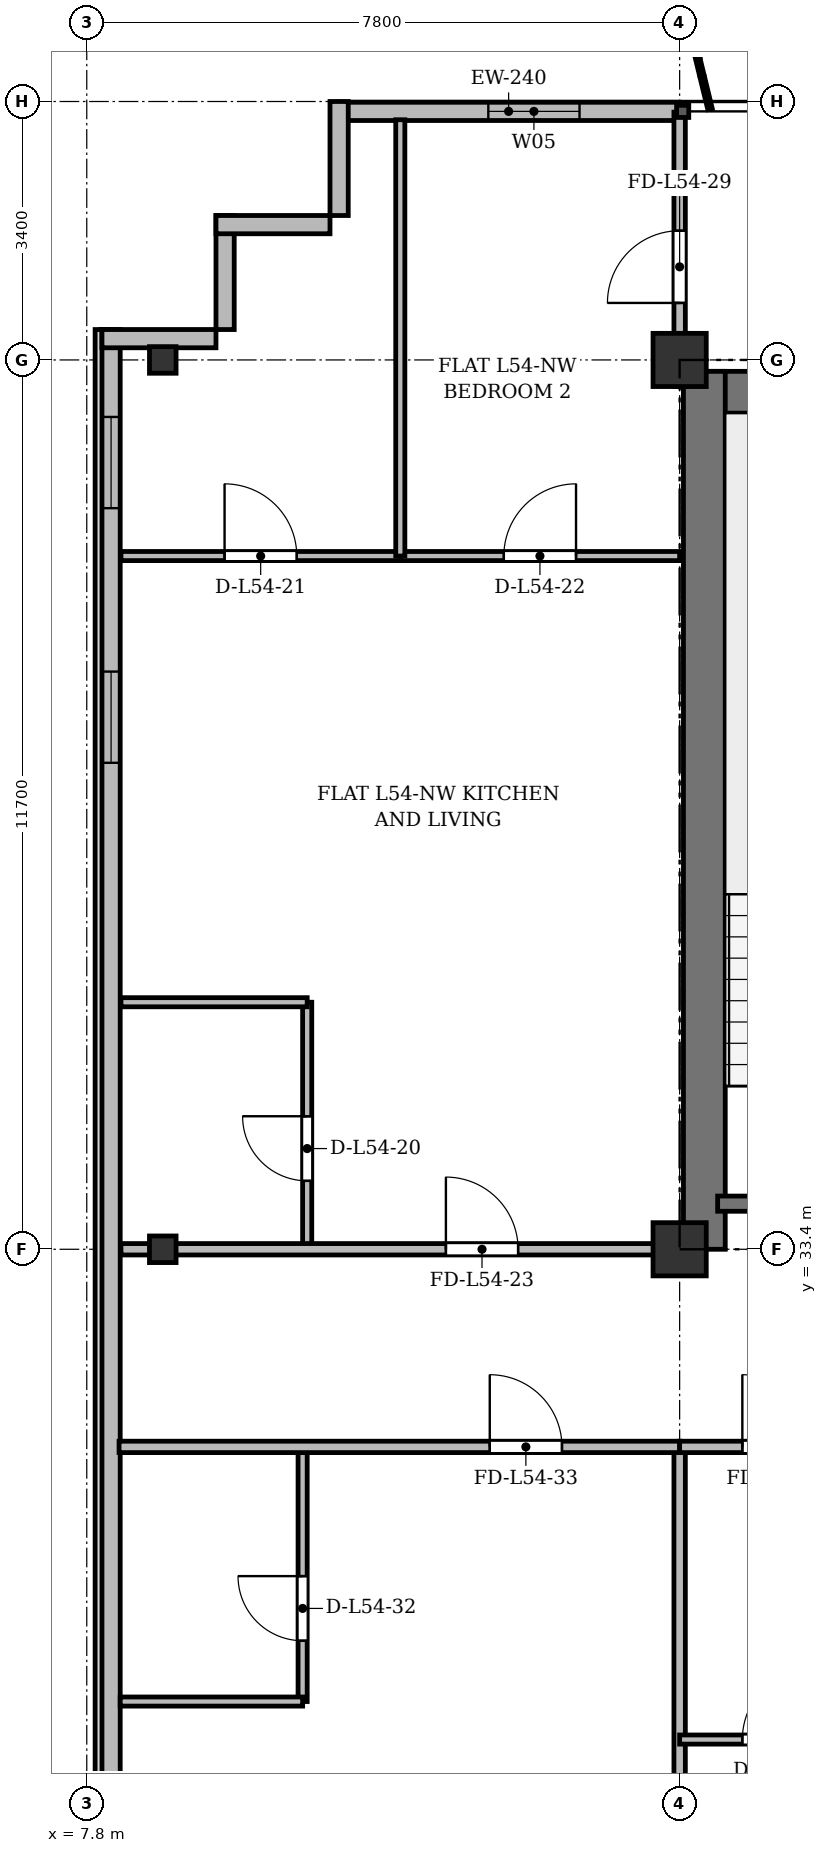
"""IFC4 building model, lengths in metres.
Left out: names, types, materials, properties, quantities, classifications, styles, units other than length and angle.
Written with IfcOpenShell. Run it as: python <this file> out.ifc"""

import sys

from ifc_helpers import new_model, si_unit, direction, frame, frame_2d, origin, origin_2d, place, context, subcontext, project, spatial, rectangle, i_section, extrude, source, transform, mapped, element, fill, save


model = new_model("IFC4")
c1 = context("Model", 3, precision=1e-05, world=origin(), true_north=direction((0.0, 1.0)))
c2 = subcontext(c1, "Body", "Model", "MODEL_VIEW")
j1 = project(units=[si_unit("LENGTHUNIT", "METRE"), si_unit("PLANEANGLEUNIT", "RADIAN")], contexts=[c1])
p1 = place(None, origin())
s1 = spatial("IfcSite", under=j1, at=p1, CompositionType="ELEMENT")
p2 = place(p1, origin())
s2 = spatial("IfcBuilding", under=s1, at=p2, CompositionType="ELEMENT")
p3 = place(p2, frame((0.0, 0.0, 208.5)))
s3 = spatial("IfcBuildingStorey", under=s2, at=p3, CompositionType="ELEMENT", Elevation=208.5)
m1 = source(origin(), c2, "Body", "SweptSolid", [
    extrude(i_section(OverallWidth=0.35, OverallDepth=0.35, WebThickness=0.018, FlangeThickness=0.028, at=origin_2d()), origin(), (0.0, 0.0, 1.0), 3.6),
])
for number, where, z_axis, x_axis in (
    (1, (8.8, 33.4, 0.0), (0.0, 0.0, 1.0), (1.0, 0.0, 0.0)),
    (2, (8.8, 45.1, 0.0), (0.0, 0.0, 1.0), (1.0, 0.0, 0.0)),
):
    element("IfcColumn", number, at=place(p3, frame(where, z_axis=z_axis, x_axis=x_axis)), inside=s3, PredefinedType="COLUMN", context=c2, shape_type="MappedRepresentation", body=[
        mapped(m1, transform((0.0, 0.0, 0.0), x_axis=(1.0, 0.0, 0.0), y_axis=(0.0, 1.0, 0.0), z_axis=(0.0, 0.0, 1.0), scale=1.0)),
    ])
m2 = source(origin(), c2, "Body", "SweptSolid", [
    extrude(rectangle(XDim=0.7, YDim=0.7, at=origin_2d()), origin(), (0.0, 0.0, 1.0), 3.6),
])
for number, where, z_axis, x_axis in (
    (3, (15.6, 33.4, 0.0), (0.0, 0.0, 1.0), (1.0, 0.0, 0.0)),
    (4, (15.6, 45.1, 0.0), (0.0, 0.0, 1.0), (1.0, 0.0, 0.0)),
):
    element("IfcColumn", number, at=place(p3, frame(where, z_axis=z_axis, x_axis=x_axis)), inside=s3, PredefinedType="COLUMN", context=c2, shape_type="MappedRepresentation", body=[
        mapped(m2, transform((0.0, 0.0, 0.0), x_axis=(1.0, 0.0, 0.0), y_axis=(0.0, 1.0, 0.0), z_axis=(0.0, 0.0, 1.0), scale=1.0)),
    ])
p4 = place(p3, frame((11.1, 48.37, 0.0), z_axis=(0.0, 0.0, 1.0), x_axis=(1.0, 0.0, 0.0)))
e5 = element("IfcWall", 5, at=p4, inside=s3, PredefinedType="SOLIDWALL", context=c2, shape_type="SweptSolid", body=[
    extrude(rectangle(XDim=4.5, YDim=0.24, at=frame_2d((2.25, 0.0))), origin(), (0.0, 0.0, 1.0), 3.36),
])
p5 = place(p4, frame((1.983, 0.0, 0.9)))
e6 = element("IfcOpeningElement", 6, at=p5, cuts=e5, PredefinedType="OPENING", context=c2, shape_type="SweptSolid", body=[
    extrude(rectangle(XDim=1.2, YDim=1.65, at=frame_2d((0.6, 0.825))), frame((0.0, 0.13, 0.0), z_axis=(0.0, -1.0, 0.0), x_axis=(1.0, 0.0, 0.0)), (0.0, 0.0, 1.0), 0.26),
])
p6 = place(p3, frame((8.12, 6.4, 0.0), z_axis=(0.0, 0.0, 1.0), x_axis=(0.0, 1.0, 0.0)))
e7 = element("IfcWall", 7, at=p6, inside=s3, PredefinedType="SOLIDWALL", context=c2, shape_type="SweptSolid", body=[
    extrude(rectangle(XDim=39.1, YDim=0.24, at=frame_2d((19.55, 0.0))), origin(), (0.0, 0.0, 1.0), 3.36),
])
p7 = place(p6, frame((1.45, 0.0, 0.92)))
e8 = element("IfcOpeningElement", 8, at=p7, cuts=e7, PredefinedType="OPENING", context=c2, shape_type="SweptSolid", body=[
    extrude(rectangle(XDim=1.2, YDim=1.65, at=frame_2d((0.6, 0.825))), frame((0.0, 0.13, 0.0), z_axis=(0.0, -1.0, 0.0), x_axis=(1.0, 0.0, 0.0)), (0.0, 0.0, 1.0), 0.26),
])
p8 = place(p6, frame((3.7, 0.0, 0.92)))
e9 = element("IfcOpeningElement", 9, at=p8, cuts=e7, PredefinedType="OPENING", context=c2, shape_type="SweptSolid", body=[
    extrude(rectangle(XDim=2.6, YDim=1.9, at=frame_2d((1.3, 0.95))), frame((0.0, 0.13, 0.0), z_axis=(0.0, -1.0, 0.0), x_axis=(1.0, 0.0, 0.0)), (0.0, 0.0, 1.0), 0.26),
])
p9 = place(p6, frame((7.9, 0.0, 0.92)))
e10 = element("IfcOpeningElement", 10, at=p9, cuts=e7, PredefinedType="OPENING", context=c2, shape_type="SweptSolid", body=[
    extrude(rectangle(XDim=2.6, YDim=1.9, at=frame_2d((1.3, 0.95))), frame((0.0, 0.13, 0.0), z_axis=(0.0, -1.0, 0.0), x_axis=(1.0, 0.0, 0.0)), (0.0, 0.0, 1.0), 0.26),
])
p10 = place(p6, frame((15.1, 0.0, 0.92)))
e11 = element("IfcOpeningElement", 11, at=p10, cuts=e7, PredefinedType="OPENING", context=c2, shape_type="SweptSolid", body=[
    extrude(rectangle(XDim=2.6, YDim=1.9, at=frame_2d((1.3, 0.95))), frame((0.0, 0.13, 0.0), z_axis=(0.0, -1.0, 0.0), x_axis=(1.0, 0.0, 0.0)), (0.0, 0.0, 1.0), 0.26),
])
p11 = place(p6, frame((33.4, 0.0, 0.92)))
e12 = element("IfcOpeningElement", 12, at=p11, cuts=e7, PredefinedType="OPENING", context=c2, shape_type="SweptSolid", body=[
    extrude(rectangle(XDim=1.2, YDim=1.65, at=frame_2d((0.6, 0.825))), frame((0.0, 0.13, 0.0), z_axis=(0.0, -1.0, 0.0), x_axis=(1.0, 0.0, 0.0)), (0.0, 0.0, 1.0), 0.26),
])
p12 = place(p6, frame((36.75, 0.0, 0.92)))
e13 = element("IfcOpeningElement", 13, at=p12, cuts=e7, PredefinedType="OPENING", context=c2, shape_type="SweptSolid", body=[
    extrude(rectangle(XDim=1.2, YDim=1.65, at=frame_2d((0.6, 0.825))), frame((0.0, 0.13, 0.0), z_axis=(0.0, -1.0, 0.0), x_axis=(1.0, 0.0, 0.0)), (0.0, 0.0, 1.0), 0.26),
])
for number, where, z_axis, x_axis in (
    (14, (8.0, 45.38, 0.0), (0.0, 0.0, 1.0), (1.0, 0.0, 0.0)),
    (15, (9.62, 45.5, 0.0), (0.0, 0.0, 1.0), (0.0, 1.0, 0.0)),
    (16, (9.5, 46.88, 0.0), (0.0, 0.0, 1.0), (1.0, 0.0, 0.0)),
    (17, (11.12, 47.0, 0.0), (0.0, 0.0, 1.0), (0.0, 1.0, 0.0)),
):
    element("IfcWall", number, at=place(p3, frame(where, z_axis=z_axis, x_axis=x_axis)), inside=s3, PredefinedType="SOLIDWALL", context=c2, shape_type="SweptSolid", body=[
        extrude(rectangle(XDim=1.5, YDim=0.24, at=frame_2d((0.75, 0.0))), origin(), (0.0, 0.0, 1.0), 3.36),
    ])
p13 = place(p3, frame((15.65, 44.675, 0.0), z_axis=(0.0, 0.0, 1.0), x_axis=(1.0, 0.0, 0.0)))
e18 = element("IfcWall", 18, at=p13, inside=s3, PredefinedType="SHEAR", context=c2, shape_type="SweptSolid", body=[
    extrude(rectangle(XDim=43.1, YDim=0.55, at=frame_2d((21.55, 0.0))), origin(), (0.0, 0.0, 1.0), 3.36),
])
p14 = place(p3, frame((15.925, 33.4, 0.0), z_axis=(0.0, 0.0, 1.0), x_axis=(0.0, 1.0, 0.0)))
e19 = element("IfcWall", 19, at=p14, inside=s3, PredefinedType="SHEAR", context=c2, shape_type="SweptSolid", body=[
    extrude(rectangle(XDim=11.55, YDim=0.55, at=frame_2d((5.775, 0.0))), origin(), (0.0, 0.0, 1.0), 3.36),
])
p15 = place(p3, frame((16.1, 34.0, 0.0), z_axis=(0.0, 0.0, 1.0), x_axis=(1.0, 0.0, 0.0)))
e20 = element("IfcWall", 20, at=p15, inside=s3, PredefinedType="SHEAR", context=c2, shape_type="SweptSolid", body=[
    extrude(rectangle(XDim=3.4, YDim=0.2, at=frame_2d((1.7, 0.0))), origin(), (0.0, 0.0, 1.0), 3.36),
])
p16 = place(p3, frame((10.7, 33.4, 0.0), z_axis=(0.0, 0.0, 1.0), x_axis=(0.0, 1.0, 0.0)))
e21 = element("IfcWall", 21, at=p16, inside=s3, PredefinedType="PARTITIONING", context=c2, shape_type="SweptSolid", body=[
    extrude(rectangle(XDim=3.25, YDim=0.12, at=frame_2d((1.625, 0.0))), origin(), (0.0, 0.0, 1.0), 2.91),
])
p17 = place(p16, frame((0.9, 0.0, 0.0)))
e22 = element("IfcOpeningElement", 22, at=p17, cuts=e21, PredefinedType="OPENING", context=c2, shape_type="SweptSolid", body=[
    extrude(rectangle(XDim=0.85, YDim=2.1, at=frame_2d((0.425, 1.05))), frame((0.0, 0.07, 0.0), z_axis=(0.0, -1.0, 0.0), x_axis=(1.0, 0.0, 0.0)), (0.0, 0.0, 1.0), 0.14),
])
p18 = place(p3, frame((8.25, 36.65, 0.0), z_axis=(0.0, 0.0, 1.0), x_axis=(1.0, 0.0, 0.0)))
e23 = element("IfcWall", 23, at=p18, inside=s3, PredefinedType="PARTITIONING", context=c2, shape_type="SweptSolid", body=[
    extrude(rectangle(XDim=2.45, YDim=0.12, at=frame_2d((1.225, 0.0))), origin(), (0.0, 0.0, 1.0), 2.86),
])
p19 = place(p3, frame((8.25, 42.52, 0.0), z_axis=(0.0, 0.0, 1.0), x_axis=(1.0, 0.0, 0.0)))
e24 = element("IfcWall", 24, at=p19, inside=s3, PredefinedType="PARTITIONING", context=c2, shape_type="SweptSolid", body=[
    extrude(rectangle(XDim=3.675, YDim=0.12, at=frame_2d((1.837, 0.0))), origin(), (0.0, 0.0, 1.0), 2.86),
])
p20 = place(p19, frame((1.363, 0.0, 0.0)))
e25 = element("IfcOpeningElement", 25, at=p20, cuts=e24, PredefinedType="OPENING", context=c2, shape_type="SweptSolid", body=[
    extrude(rectangle(XDim=0.95, YDim=2.15, at=frame_2d((0.475, 1.075))), frame((0.0, 0.07, 0.0), z_axis=(0.0, -1.0, 0.0), x_axis=(1.0, 0.0, 0.0)), (0.0, 0.0, 1.0), 0.14),
])
p21 = place(p3, frame((11.925, 42.52, 0.0), z_axis=(0.0, 0.0, 1.0), x_axis=(1.0, 0.0, 0.0)))
e26 = element("IfcWall", 26, at=p21, inside=s3, PredefinedType="PARTITIONING", context=c2, shape_type="SweptSolid", body=[
    extrude(rectangle(XDim=3.675, YDim=0.12, at=frame_2d((1.837, 0.0))), origin(), (0.0, 0.0, 1.0), 2.86),
])
p22 = place(p21, frame((1.362, 0.0, 0.0)))
e27 = element("IfcOpeningElement", 27, at=p22, cuts=e26, PredefinedType="OPENING", context=c2, shape_type="SweptSolid", body=[
    extrude(rectangle(XDim=0.95, YDim=2.15, at=frame_2d((0.475, 1.075))), frame((0.0, 0.07, 0.0), z_axis=(0.0, -1.0, 0.0), x_axis=(1.0, 0.0, 0.0)), (0.0, 0.0, 1.0), 0.14),
])
p23 = place(p3, frame((11.925, 42.52, 0.0), z_axis=(0.0, 0.0, 1.0), x_axis=(0.0, 1.0, 0.0)))
e28 = element("IfcWall", 28, at=p23, inside=s3, PredefinedType="PARTITIONING", context=c2, shape_type="SweptSolid", body=[
    extrude(rectangle(XDim=5.74, YDim=0.12, at=frame_2d((2.87, 0.0))), origin(), (0.0, 0.0, 1.0), 2.91),
])
p24 = place(p3, frame((8.25, 33.4, 0.0), z_axis=(0.0, 0.0, 1.0), x_axis=(1.0, 0.0, 0.0)))
e29 = element("IfcWall", 29, at=p24, inside=s3, PredefinedType="PARTITIONING", context=c2, shape_type="SweptSolid", body=[
    extrude(rectangle(XDim=7.35, YDim=0.15, at=frame_2d((3.675, 0.0))), origin(), (0.0, 0.0, 1.0), 2.91),
])
p25 = place(p24, frame((4.275, 0.0, 0.0)))
e30 = element("IfcOpeningElement", 30, at=p25, cuts=e29, PredefinedType="OPENING", context=c2, shape_type="SweptSolid", body=[
    extrude(rectangle(XDim=0.95, YDim=2.15, at=frame_2d((0.475, 1.075))), frame((0.0, 0.085, 0.0), z_axis=(0.0, -1.0, 0.0), x_axis=(1.0, 0.0, 0.0)), (0.0, 0.0, 1.0), 0.17),
])
p26 = place(p3, frame((15.6, 44.75, 0.0), z_axis=(0.0, 0.0, 1.0), x_axis=(0.0, 1.0, 0.0)))
e31 = element("IfcWall", 31, at=p26, inside=s3, PredefinedType="PARTITIONING", context=c2, shape_type="SweptSolid", body=[
    extrude(rectangle(XDim=3.61, YDim=0.15, at=frame_2d((1.805, 0.0))), origin(), (0.0, 0.0, 1.0), 2.86),
])
p27 = place(p26, frame((1.1, 0.0, 0.0)))
e32 = element("IfcOpeningElement", 32, at=p27, cuts=e31, PredefinedType="OPENING", context=c2, shape_type="SweptSolid", body=[
    extrude(rectangle(XDim=0.95, YDim=2.15, at=frame_2d((0.475, 1.075))), frame((0.0, 0.085, 0.0), z_axis=(0.0, -1.0, 0.0), x_axis=(1.0, 0.0, 0.0)), (0.0, 0.0, 1.0), 0.17),
])
p28 = place(p3, frame((15.6, 3.625, 0.0), z_axis=(0.0, 0.0, 1.0), x_axis=(0.0, 1.0, 0.0)))
e33 = element("IfcWall", 33, at=p28, inside=s3, PredefinedType="PARTITIONING", context=c2, shape_type="SweptSolid", body=[
    extrude(rectangle(XDim=27.175, YDim=0.15, at=frame_2d((13.587, 0.0))), origin(), (0.0, 0.0, 1.0), 2.86),
])
p29 = place(p3, frame((10.64, 27.45, 0.0), z_axis=(0.0, 0.0, 1.0), x_axis=(0.0, 1.0, 0.0)))
e34 = element("IfcWall", 34, at=p29, inside=s3, PredefinedType="PARTITIONING", context=c2, shape_type="SweptSolid", body=[
    extrude(rectangle(XDim=3.35, YDim=0.12, at=frame_2d((1.675, 0.0))), origin(), (0.0, 0.0, 1.0), 3.36),
])
p30 = place(p29, frame((0.8, 0.0, 0.0)))
e35 = element("IfcOpeningElement", 35, at=p30, cuts=e34, PredefinedType="OPENING", context=c2, shape_type="SweptSolid", body=[
    extrude(rectangle(XDim=0.85, YDim=2.1, at=frame_2d((0.425, 1.05))), frame((0.0, 0.07, 0.0), z_axis=(0.0, -1.0, 0.0), x_axis=(1.0, 0.0, 0.0)), (0.0, 0.0, 1.0), 0.14),
])
p31 = place(p3, frame((8.24, 27.45, 0.0), z_axis=(0.0, 0.0, 1.0), x_axis=(1.0, 0.0, 0.0)))
e36 = element("IfcWall", 36, at=p31, inside=s3, PredefinedType="PARTITIONING", context=c2, shape_type="SweptSolid", body=[
    extrude(rectangle(XDim=2.4, YDim=0.12, at=frame_2d((1.2, 0.0))), origin(), (0.0, 0.0, 1.0), 2.86),
])
p32 = place(p3, frame((8.225, 30.8, 0.0), z_axis=(0.0, 0.0, 1.0), x_axis=(1.0, 0.0, 0.0)))
e37 = element("IfcWall", 37, at=p32, inside=s3, PredefinedType="PARTITIONING", context=c2, shape_type="SweptSolid", body=[
    extrude(rectangle(XDim=7.375, YDim=0.15, at=frame_2d((3.688, 0.0))), origin(), (0.0, 0.0, 1.0), 2.86),
])
p33 = place(p32, frame((4.877, 0.0, 0.0)))
e38 = element("IfcOpeningElement", 38, at=p33, cuts=e37, PredefinedType="OPENING", context=c2, shape_type="SweptSolid", body=[
    extrude(rectangle(XDim=0.95, YDim=2.15, at=frame_2d((0.475, 1.075))), frame((0.0, 0.085, 0.0), z_axis=(0.0, -1.0, 0.0), x_axis=(1.0, 0.0, 0.0)), (0.0, 0.0, 1.0), 0.17),
])
p34 = place(p3, frame((15.6, 30.8, 0.0), z_axis=(0.0, 0.0, 1.0), x_axis=(1.0, 0.0, 0.0)))
e39 = element("IfcWall", 39, at=p34, inside=s3, PredefinedType="PARTITIONING", context=c2, shape_type="SweptSolid", body=[
    extrude(rectangle(XDim=2.6, YDim=0.15, at=frame_2d((1.3, 0.0))), origin(), (0.0, 0.0, 1.0), 2.86),
])
p35 = place(p34, frame((0.825, 0.0, 0.0)))
e40 = element("IfcOpeningElement", 40, at=p35, cuts=e39, PredefinedType="OPENING", context=c2, shape_type="SweptSolid", body=[
    extrude(rectangle(XDim=0.95, YDim=2.15, at=frame_2d((0.475, 1.075))), frame((0.0, 0.085, 0.0), z_axis=(0.0, -1.0, 0.0), x_axis=(1.0, 0.0, 0.0)), (0.0, 0.0, 1.0), 0.17),
])
p36 = place(p3, frame((15.6, 26.95, 0.0), z_axis=(0.0, 0.0, 1.0), x_axis=(1.0, 0.0, 0.0)))
e41 = element("IfcWall", 41, at=p36, inside=s3, PredefinedType="PARTITIONING", context=c2, shape_type="SweptSolid", body=[
    extrude(rectangle(XDim=2.6, YDim=0.12, at=frame_2d((1.3, 0.0))), origin(), (0.0, 0.0, 1.0), 2.86),
])
p37 = place(p36, frame((0.825, 0.0, 0.0)))
e42 = element("IfcOpeningElement", 42, at=p37, cuts=e41, PredefinedType="OPENING", context=c2, shape_type="SweptSolid", body=[
    extrude(rectangle(XDim=0.95, YDim=2.15, at=frame_2d((0.475, 1.075))), frame((0.0, 0.07, 0.0), z_axis=(0.0, -1.0, 0.0), x_axis=(1.0, 0.0, 0.0)), (0.0, 0.0, 1.0), 0.14),
])
m3 = source(origin(), c2, "Body", "SweptSolid", [
    extrude(rectangle(XDim=1.2, YDim=1.65, at=frame_2d((0.6, 0.825))), frame((0.0, 0.03, 0.0), z_axis=(0.0, -1.0, 0.0), x_axis=(1.0, 0.0, 0.0)), (0.0, 0.0, 1.0), 0.06),
])
p38 = place(p5, origin())
e43 = element("IfcWindow", 43, at=p38, inside=s3, PartitioningType="SINGLE_PANEL", PredefinedType="WINDOW", context=c2, shape_type="MappedRepresentation", body=[
    mapped(m3, transform((0.0, 0.0, 0.0), x_axis=(1.0, 0.0, 0.0), y_axis=(0.0, 1.0, 0.0), z_axis=(0.0, 0.0, 1.0), scale=1.0)),
])
fill(e6, e43)
p39 = place(p11, origin())
e44 = element("IfcWindow", 44, at=p39, inside=s3, PartitioningType="SINGLE_PANEL", PredefinedType="WINDOW", context=c2, shape_type="MappedRepresentation", body=[
    mapped(m3, transform((0.0, 0.0, 0.0), x_axis=(1.0, 0.0, 0.0), y_axis=(0.0, 1.0, 0.0), z_axis=(0.0, 0.0, 1.0), scale=1.0)),
])
fill(e12, e44)
p40 = place(p12, origin())
e45 = element("IfcWindow", 45, at=p40, inside=s3, PartitioningType="SINGLE_PANEL", PredefinedType="WINDOW", context=c2, shape_type="MappedRepresentation", body=[
    mapped(m3, transform((0.0, 0.0, 0.0), x_axis=(1.0, 0.0, 0.0), y_axis=(0.0, 1.0, 0.0), z_axis=(0.0, 0.0, 1.0), scale=1.0)),
])
fill(e13, e45)
m4 = source(origin(), c2, "Body", "SweptSolid", [
    extrude(rectangle(XDim=0.85, YDim=2.1, at=frame_2d((0.425, 1.05))), frame((0.0, 0.025, 0.0), z_axis=(0.0, -1.0, 0.0), x_axis=(1.0, 0.0, 0.0)), (0.0, 0.0, 1.0), 0.05),
])
p41 = place(p17, origin())
e46 = element("IfcDoor", 46, at=p41, inside=s3, OperationType="SINGLE_SWING_RIGHT", PredefinedType="DOOR", context=c2, shape_type="MappedRepresentation", body=[
    mapped(m4, transform((0.0, 0.0, 0.0), x_axis=(1.0, 0.0, 0.0), y_axis=(0.0, 1.0, 0.0), z_axis=(0.0, 0.0, 1.0), scale=1.0)),
])
fill(e22, e46)
m5 = source(origin(), c2, "Body", "SweptSolid", [
    extrude(rectangle(XDim=0.95, YDim=2.15, at=frame_2d((0.475, 1.075))), frame((0.0, 0.025, 0.0), z_axis=(0.0, -1.0, 0.0), x_axis=(1.0, 0.0, 0.0)), (0.0, 0.0, 1.0), 0.05),
])
p42 = place(p20, origin())
e47 = element("IfcDoor", 47, at=p42, inside=s3, OperationType="SINGLE_SWING_LEFT", PredefinedType="DOOR", context=c2, shape_type="MappedRepresentation", body=[
    mapped(m5, transform((0.0, 0.0, 0.0), x_axis=(1.0, 0.0, 0.0), y_axis=(0.0, 1.0, 0.0), z_axis=(0.0, 0.0, 1.0), scale=1.0)),
])
fill(e25, e47)
p43 = place(p22, origin())
e48 = element("IfcDoor", 48, at=p43, inside=s3, OperationType="SINGLE_SWING_RIGHT", PredefinedType="DOOR", context=c2, shape_type="MappedRepresentation", body=[
    mapped(m5, transform((0.0, 0.0, 0.0), x_axis=(1.0, 0.0, 0.0), y_axis=(0.0, 1.0, 0.0), z_axis=(0.0, 0.0, 1.0), scale=1.0)),
])
fill(e27, e48)
p44 = place(p25, origin())
e49 = element("IfcDoor", 49, at=p44, inside=s3, OperationType="SINGLE_SWING_LEFT", PredefinedType="DOOR", context=c2, shape_type="MappedRepresentation", body=[
    mapped(m5, transform((0.0, 0.0, 0.0), x_axis=(1.0, 0.0, 0.0), y_axis=(0.0, 1.0, 0.0), z_axis=(0.0, 0.0, 1.0), scale=1.0)),
])
fill(e30, e49)
p45 = place(p27, origin())
e50 = element("IfcDoor", 50, at=p45, inside=s3, OperationType="SINGLE_SWING_LEFT", PredefinedType="DOOR", context=c2, shape_type="MappedRepresentation", body=[
    mapped(m5, transform((0.0, 0.0, 0.0), x_axis=(1.0, 0.0, 0.0), y_axis=(0.0, 1.0, 0.0), z_axis=(0.0, 0.0, 1.0), scale=1.0)),
])
fill(e32, e50)
p46 = place(p30, origin())
e51 = element("IfcDoor", 51, at=p46, inside=s3, OperationType="SINGLE_SWING_RIGHT", PredefinedType="DOOR", context=c2, shape_type="MappedRepresentation", body=[
    mapped(m4, transform((0.0, 0.0, 0.0), x_axis=(1.0, 0.0, 0.0), y_axis=(0.0, 1.0, 0.0), z_axis=(0.0, 0.0, 1.0), scale=1.0)),
])
fill(e35, e51)
p47 = place(p33, origin())
e52 = element("IfcDoor", 52, at=p47, inside=s3, OperationType="SINGLE_SWING_LEFT", PredefinedType="DOOR", context=c2, shape_type="MappedRepresentation", body=[
    mapped(m5, transform((0.0, 0.0, 0.0), x_axis=(1.0, 0.0, 0.0), y_axis=(0.0, 1.0, 0.0), z_axis=(0.0, 0.0, 1.0), scale=1.0)),
])
fill(e38, e52)
p48 = place(p35, origin())
e53 = element("IfcDoor", 53, at=p48, inside=s3, OperationType="SINGLE_SWING_LEFT", PredefinedType="DOOR", context=c2, shape_type="MappedRepresentation", body=[
    mapped(m5, transform((0.0, 0.0, 0.0), x_axis=(1.0, 0.0, 0.0), y_axis=(0.0, 1.0, 0.0), z_axis=(0.0, 0.0, 1.0), scale=1.0)),
])
fill(e40, e53)
p49 = place(p37, origin())
e54 = element("IfcDoor", 54, at=p49, inside=s3, OperationType="SINGLE_SWING_RIGHT", PredefinedType="DOOR", context=c2, shape_type="MappedRepresentation", body=[
    mapped(m5, transform((0.0, 0.0, 0.0), x_axis=(1.0, 0.0, 0.0), y_axis=(0.0, 1.0, 0.0), z_axis=(0.0, 0.0, 1.0), scale=1.0)),
])
fill(e42, e54)
save(model, sys.argv[1])
